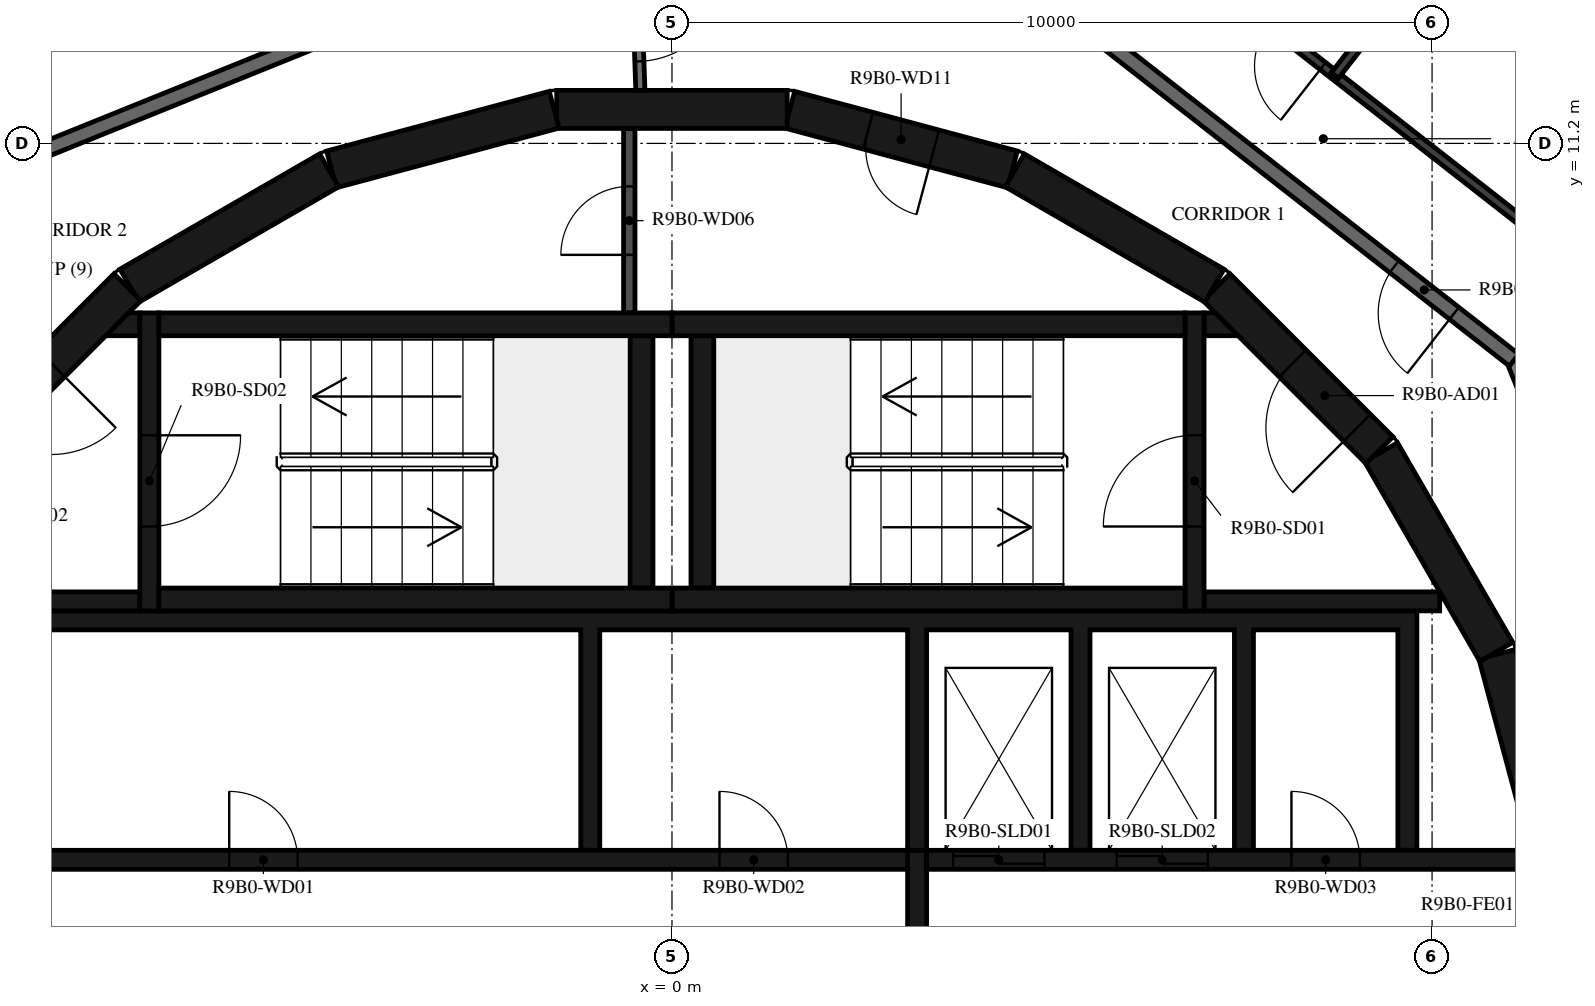
"""IFC4 building model, lengths in metres.
Left out: names, types, materials, properties, quantities, classifications, styles, units other than length and angle.
Written with IfcOpenShell. Run it as: python <this file> out.ifc"""

import sys

from ifc_helpers import new_model, si_unit, direction, frame, frame_2d, origin, place, context, subcontext, project, spatial, polyline, rectangle, outline, extrude, element, fill, save


model = new_model("IFC4")
c1 = context("Model", 3, precision=1e-05, world=origin(), true_north=direction((0.0, 1.0)))
c2 = subcontext(c1, "Body", "Model", "MODEL_VIEW")
j1 = project(units=[si_unit("LENGTHUNIT", "METRE"), si_unit("PLANEANGLEUNIT", "RADIAN")], contexts=[c1])
p1 = place(None, origin())
s1 = spatial("IfcSite", under=j1, at=p1, CompositionType="ELEMENT")
p2 = place(p1, origin())
s2 = spatial("IfcBuilding", under=s1, at=p2, CompositionType="ELEMENT")
p3 = place(p2, frame((0.0, 0.0, 347.0)))
s3 = spatial("IfcBuildingStorey", under=s2, at=p3, CompositionType="ELEMENT", Elevation=347.0)
for number, where, z_axis, x_axis in (
    (1, (11.643, 1.55, 0.0), (0.0, 0.0, 1.0), (-0.259, 0.966, 0.0)),
    (2, (10.845, 4.51, 0.0), (0.0, 0.0, 1.0), (-0.5, 0.866, 0.0)),
):
    element("IfcWall", number, at=place(p3, frame(where, z_axis=z_axis, x_axis=x_axis)), inside=s3, PredefinedType="SHEAR", context=c2, shape_type="SweptSolid", body=[
        extrude(rectangle(XDim=3.033, YDim=0.5, at=frame_2d((1.516, 0.0))), origin(), (0.0, 0.0, 1.0), 3.12),
    ])
p4 = place(p3, frame((9.308, 7.164, 0.0), z_axis=(0.0, 0.0, 1.0), x_axis=(-0.707106781187, 0.707106781187, 0.0)))
e3 = element("IfcWall", 3, at=p4, inside=s3, PredefinedType="SHEAR", context=c2, shape_type="SweptSolid", body=[
    extrude(rectangle(XDim=3.032, YDim=0.5, at=frame_2d((1.516, 0.0))), origin(), (0.0, 0.0, 1.0), 3.12),
])
p5 = place(p4, frame((0.416, 0.0, 0.0)))
e4 = element("IfcOpeningElement", 4, at=p5, cuts=e3, PredefinedType="OPENING", context=c2, shape_type="SweptSolid", body=[
    extrude(rectangle(XDim=1.2, YDim=2.1, at=frame_2d((0.6, 1.05))), frame((0.0, 0.26, 0.0), z_axis=(0.0, -1.0, 0.0), x_axis=(1.0, 0.0, 0.0)), (0.0, 0.0, 1.0), 0.52),
])
p6 = place(p3, frame((7.137, 9.329, 0.0), z_axis=(0.0, 0.0, 1.0), x_axis=(-0.865975092491, 0.500087131594, 0.0)))
e5 = element("IfcWall", 5, at=p6, inside=s3, PredefinedType="SHEAR", context=c2, shape_type="SweptSolid", body=[
    extrude(rectangle(XDim=3.033, YDim=0.5, at=frame_2d((1.516, 0.0))), origin(), (0.0, 0.0, 1.0), 3.12),
])
p7 = place(p3, frame((4.479, 10.858, 0.0), z_axis=(0.0, 0.0, 1.0), x_axis=(-0.965948410781, 0.258734743916, 0.0)))
e6 = element("IfcWall", 6, at=p7, inside=s3, PredefinedType="SHEAR", context=c2, shape_type="SweptSolid", body=[
    extrude(rectangle(XDim=3.033, YDim=0.5, at=frame_2d((1.516, 0.0))), origin(), (0.0, 0.0, 1.0), 3.12),
])
p8 = place(p7, frame((1.066, 0.0, 0.0)))
e7 = element("IfcOpeningElement", 7, at=p8, cuts=e6, PredefinedType="OPENING", context=c2, shape_type="SweptSolid", body=[
    extrude(rectangle(XDim=0.9, YDim=2.1, at=frame_2d((0.45, 1.05))), frame((0.0, 0.26, 0.0), z_axis=(0.0, -1.0, 0.0), x_axis=(1.0, 0.0, 0.0)), (0.0, 0.0, 1.0), 0.52),
])
for number, where, z_axis, x_axis in (
    (8, (1.516, 11.647, 0.0), (0.0, 0.0, 1.0), (-1.0, 0.0, 0.0)),
    (9, (-1.55, 11.643, 0.0), (0.0, 0.0, 1.0), (-0.966, -0.259, 0.0)),
    (10, (-4.51, 10.845, 0.0), (0.0, 0.0, 1.0), (-0.866, -0.5, 0.0)),
):
    element("IfcWall", number, at=place(p3, frame(where, z_axis=z_axis, x_axis=x_axis)), inside=s3, PredefinedType="SHEAR", context=c2, shape_type="SweptSolid", body=[
        extrude(rectangle(XDim=3.033, YDim=0.5, at=frame_2d((1.516, 0.0))), origin(), (0.0, 0.0, 1.0), 3.12),
    ])
p9 = place(p3, frame((-7.164, 9.308, 0.0), z_axis=(0.0, 0.0, 1.0), x_axis=(-0.707106781187, -0.707106781187, 0.0)))
e11 = element("IfcWall", 11, at=p9, inside=s3, PredefinedType="SHEAR", context=c2, shape_type="SweptSolid", body=[
    extrude(rectangle(XDim=3.032, YDim=0.5, at=frame_2d((1.516, 0.0))), origin(), (0.0, 0.0, 1.0), 3.12),
])
p10 = place(p9, frame((1.416, 0.0, 0.0)))
e12 = element("IfcOpeningElement", 12, at=p10, cuts=e11, PredefinedType="OPENING", context=c2, shape_type="SweptSolid", body=[
    extrude(rectangle(XDim=1.2, YDim=2.1, at=frame_2d((0.6, 1.05))), frame((0.0, 0.26, 0.0), z_axis=(0.0, -1.0, 0.0), x_axis=(1.0, 0.0, 0.0)), (0.0, 0.0, 1.0), 0.52),
])
for number, where, z_axis, x_axis in (
    (13, (0.0, 5.2, 0.0), (0.0, 0.0, 1.0), (1.0, 0.0, 0.0)),
    (14, (0.0, 8.82, 0.0), (0.0, 0.0, 1.0), (1.0, 0.0, 0.0)),
):
    element("IfcWall", number, at=place(p3, frame(where, z_axis=z_axis, x_axis=x_axis)), inside=s3, PredefinedType="SHEAR", context=c2, shape_type="SweptSolid", body=[
        extrude(rectangle(XDim=6.75, YDim=0.3, at=frame_2d((3.375, 0.0))), origin(), (0.0, 0.0, 1.0), 3.12),
    ])
p11 = place(p3, frame((0.4, 5.35, 0.0), z_axis=(0.0, 0.0, 1.0), x_axis=(0.0, 1.0, 0.0)))
e15 = element("IfcWall", 15, at=p11, inside=s3, PredefinedType="SHEAR", context=c2, shape_type="SweptSolid", body=[
    extrude(rectangle(XDim=3.32, YDim=0.3, at=frame_2d((1.66, 0.0))), origin(), (0.0, 0.0, 1.0), 3.12),
])
p12 = place(p3, frame((6.875, 5.05, 0.0), z_axis=(0.0, 0.0, 1.0), x_axis=(0.0, 1.0, 0.0)))
e16 = element("IfcWall", 16, at=p12, inside=s3, PredefinedType="SHEAR", context=c2, shape_type="SweptSolid", body=[
    extrude(rectangle(XDim=3.92, YDim=0.25, at=frame_2d((1.96, 0.0))), origin(), (0.0, 0.0, 1.0), 3.12),
])
p13 = place(p12, frame((1.11, 0.0, 0.0)))
e17 = element("IfcOpeningElement", 17, at=p13, cuts=e16, PredefinedType="OPENING", context=c2, shape_type="SweptSolid", body=[
    extrude(rectangle(XDim=1.2, YDim=2.1, at=frame_2d((0.6, 1.05))), frame((0.0, 0.135, 0.0), z_axis=(0.0, -1.0, 0.0), x_axis=(1.0, 0.0, 0.0)), (0.0, 0.0, 1.0), 0.27),
])
p14 = place(p3, frame((7.0, 5.175, 0.0), z_axis=(0.0, 0.0, 1.0), x_axis=(1.0, 0.0, 0.0)))
e18 = element("IfcWall", 18, at=p14, inside=s3, PredefinedType="SHEAR", context=c2, shape_type="SweptSolid", body=[
    extrude(rectangle(XDim=3.1, YDim=0.25, at=frame_2d((1.55, 0.0))), origin(), (0.0, 0.0, 1.0), 3.12),
])
p15 = place(p3, origin())
e19 = element("IfcWall", 19, at=p15, inside=s3, PredefinedType="SHEAR", context=c2, shape_type="SweptSolid", body=[
    extrude(outline(polyline([(7.448, 8.67), (7.0, 8.67), (7.0, 8.97), (7.148, 8.97), (7.448, 8.67)])), origin(), (0.0, 0.0, 1.0), 3.12),
])
for number, where, z_axis, x_axis in (
    (20, (-6.75, 5.2, 0.0), (0.0, 0.0, 1.0), (1.0, 0.0, 0.0)),
    (21, (-6.75, 8.82, 0.0), (0.0, 0.0, 1.0), (1.0, 0.0, 0.0)),
):
    element("IfcWall", number, at=place(p3, frame(where, z_axis=z_axis, x_axis=x_axis)), inside=s3, PredefinedType="SHEAR", context=c2, shape_type="SweptSolid", body=[
        extrude(rectangle(XDim=6.75, YDim=0.3, at=frame_2d((3.375, 0.0))), origin(), (0.0, 0.0, 1.0), 3.12),
    ])
p16 = place(p3, frame((-0.4, 5.35, 0.0), z_axis=(0.0, 0.0, 1.0), x_axis=(0.0, 1.0, 0.0)))
e22 = element("IfcWall", 22, at=p16, inside=s3, PredefinedType="SHEAR", context=c2, shape_type="SweptSolid", body=[
    extrude(rectangle(XDim=3.32, YDim=0.3, at=frame_2d((1.66, 0.0))), origin(), (0.0, 0.0, 1.0), 3.12),
])
p17 = place(p3, frame((-6.875, 8.97, 0.0), z_axis=(0.0, 0.0, 1.0), x_axis=(0.0, -1.0, 0.0)))
e23 = element("IfcWall", 23, at=p17, inside=s3, PredefinedType="SHEAR", context=c2, shape_type="SweptSolid", body=[
    extrude(rectangle(XDim=3.92, YDim=0.25, at=frame_2d((1.96, 0.0))), origin(), (0.0, 0.0, 1.0), 3.12),
])
p18 = place(p17, frame((1.61, 0.0, 0.0)))
e24 = element("IfcOpeningElement", 24, at=p18, cuts=e23, PredefinedType="OPENING", context=c2, shape_type="SweptSolid", body=[
    extrude(rectangle(XDim=1.2, YDim=2.1, at=frame_2d((0.6, 1.05))), frame((0.0, 0.135, 0.0), z_axis=(0.0, -1.0, 0.0), x_axis=(1.0, 0.0, 0.0)), (0.0, 0.0, 1.0), 0.27),
])
p19 = place(p3, frame((-7.0, 5.175, 0.0), z_axis=(0.0, 0.0, 1.0), x_axis=(-1.0, 0.0, 0.0)))
e25 = element("IfcWall", 25, at=p19, inside=s3, PredefinedType="SHEAR", context=c2, shape_type="SweptSolid", body=[
    extrude(rectangle(XDim=3.1, YDim=0.25, at=frame_2d((1.55, 0.0))), origin(), (0.0, 0.0, 1.0), 3.12),
])
p20 = place(p3, origin())
e26 = element("IfcWall", 26, at=p20, inside=s3, PredefinedType="SHEAR", context=c2, shape_type="SweptSolid", body=[
    extrude(outline(polyline([(-7.148, 8.97), (-7.0, 8.97), (-7.0, 8.67), (-7.448, 8.67), (-7.148, 8.97)])), origin(), (0.0, 0.0, 1.0), 3.12),
])
p21 = place(p3, origin())
e27 = element("IfcWall", 27, at=p21, inside=s3, PredefinedType="SHEAR", context=c2, shape_type="SweptSolid", body=[
    extrude(outline(polyline([(-9.8, 1.9), (-9.55, 1.9), (-9.55, 4.8), (-1.2, 4.8), (-1.2, 1.9), (-0.95, 1.9), (-0.95, 4.8), (3.1, 4.8), (3.1, 1.9), (3.35, 1.9), (3.35, 4.8), (5.25, 4.8), (5.25, 1.9), (5.5, 1.9), (5.5, 4.8), (7.4, 4.8), (7.4, 1.9), (7.65, 1.9), (7.65, 4.8), (9.55, 4.8), (9.55, 1.9), (9.8, 1.9), (9.8, 4.8), (9.8, 5.05), (-9.8, 5.05), (-9.8, 4.8), (-9.8, 1.9)])), origin(), (0.0, 0.0, 1.0), 3.12),
])
p22 = place(p3, frame((-11.28, 1.775, 0.0), z_axis=(0.0, 0.0, 1.0), x_axis=(1.0, 0.0, 0.0)))
e28 = element("IfcWall", 28, at=p22, inside=s3, PredefinedType="SHEAR", context=c2, shape_type="SweptSolid", body=[
    extrude(rectangle(XDim=14.38, YDim=0.25, at=frame_2d((7.19, 0.0))), origin(), (0.0, 0.0, 1.0), 3.12),
])
p23 = place(p22, frame((5.455, 0.0, 0.0)))
e29 = element("IfcOpeningElement", 29, at=p23, cuts=e28, PredefinedType="OPENING", context=c2, shape_type="SweptSolid", body=[
    extrude(rectangle(XDim=0.9, YDim=2.1, at=frame_2d((0.45, 1.05))), frame((0.0, 0.135, 0.0), z_axis=(0.0, -1.0, 0.0), x_axis=(1.0, 0.0, 0.0)), (0.0, 0.0, 1.0), 0.27),
])
p24 = place(p22, frame((11.905, 0.0, 0.0)))
e30 = element("IfcOpeningElement", 30, at=p24, cuts=e28, PredefinedType="OPENING", context=c2, shape_type="SweptSolid", body=[
    extrude(rectangle(XDim=0.9, YDim=2.1, at=frame_2d((0.45, 1.05))), frame((0.0, 0.135, 0.0), z_axis=(0.0, -1.0, 0.0), x_axis=(1.0, 0.0, 0.0)), (0.0, 0.0, 1.0), 0.27),
])
p25 = place(p3, frame((3.35, 1.775, 0.0), z_axis=(0.0, 0.0, 1.0), x_axis=(1.0, 0.0, 0.0)))
e31 = element("IfcWall", 31, at=p25, inside=s3, PredefinedType="SHEAR", context=c2, shape_type="SweptSolid", body=[
    extrude(rectangle(XDim=7.93, YDim=0.25, at=frame_2d((3.965, 0.0))), origin(), (0.0, 0.0, 1.0), 3.12),
])
p26 = place(p25, frame((0.35, 0.0, 0.0)))
e32 = element("IfcOpeningElement", 32, at=p26, cuts=e31, PredefinedType="OPENING", context=c2, shape_type="SweptSolid", body=[
    extrude(rectangle(XDim=1.2, YDim=2.4, at=frame_2d((0.6, 1.2))), frame((0.0, 0.135, 0.0), z_axis=(0.0, -1.0, 0.0), x_axis=(1.0, 0.0, 0.0)), (0.0, 0.0, 1.0), 0.27),
])
p27 = place(p25, frame((2.5, 0.0, 0.0)))
e33 = element("IfcOpeningElement", 33, at=p27, cuts=e31, PredefinedType="OPENING", context=c2, shape_type="SweptSolid", body=[
    extrude(rectangle(XDim=1.2, YDim=2.4, at=frame_2d((0.6, 1.2))), frame((0.0, 0.135, 0.0), z_axis=(0.0, -1.0, 0.0), x_axis=(1.0, 0.0, 0.0)), (0.0, 0.0, 1.0), 0.27),
])
p28 = place(p25, frame((4.8, 0.0, 0.0)))
e34 = element("IfcOpeningElement", 34, at=p28, cuts=e31, PredefinedType="OPENING", context=c2, shape_type="SweptSolid", body=[
    extrude(rectangle(XDim=0.9, YDim=2.1, at=frame_2d((0.45, 1.05))), frame((0.0, 0.135, 0.0), z_axis=(0.0, -1.0, 0.0), x_axis=(1.0, 0.0, 0.0)), (0.0, 0.0, 1.0), 0.27),
])
p29 = place(p3, frame((3.225, -1.9, 0.0), z_axis=(0.0, 0.0, 1.0), x_axis=(0.0, 1.0, 0.0)))
e35 = element("IfcWall", 35, at=p29, inside=s3, PredefinedType="SHEAR", context=c2, shape_type="SweptSolid", body=[
    extrude(rectangle(XDim=3.8, YDim=0.25, at=frame_2d((1.9, 0.0))), origin(), (0.0, 0.0, 1.0), 3.12),
])
p30 = place(p3, frame((-0.562, 8.97, 0.0), z_axis=(0.0, 0.0, 1.0), x_axis=(0.0, 1.0, 0.0)))
e36 = element("IfcWall", 36, at=p30, inside=s3, PredefinedType="PARTITIONING", context=c2, shape_type="SweptSolid", body=[
    extrude(rectangle(XDim=2.427, YDim=0.15, at=frame_2d((1.214, 0.0))), origin(), (0.0, 0.0, 1.0), 3.12),
])
p31 = place(p30, frame((0.764, 0.0, 0.0)))
e37 = element("IfcOpeningElement", 37, at=p31, cuts=e36, PredefinedType="OPENING", context=c2, shape_type="SweptSolid", body=[
    extrude(rectangle(XDim=0.9, YDim=2.1, at=frame_2d((0.45, 1.05))), frame((0.0, 0.085, 0.0), z_axis=(0.0, -1.0, 0.0), x_axis=(1.0, 0.0, 0.0)), (0.0, 0.0, 1.0), 0.17),
])
p32 = place(p3, frame((-0.475, 13.598, 0.0), z_axis=(0.0, 0.0, 1.0), x_axis=(0.034852521429, -0.999392466326, 0.0)))
e38 = element("IfcWall", 38, at=p32, inside=s3, PredefinedType="PARTITIONING", context=c2, shape_type="SweptSolid", body=[
    extrude(rectangle(XDim=1.702, YDim=0.12, at=frame_2d((0.851, 0.0))), origin(), (0.0, 0.0, 1.0), 3.12),
])
p33 = place(p32, frame((0.12, 0.0, 0.0)))
e39 = element("IfcOpeningElement", 39, at=p33, cuts=e38, PredefinedType="OPENING", context=c2, shape_type="SweptSolid", body=[
    extrude(rectangle(XDim=1.2, YDim=2.1, at=frame_2d((0.6, 1.05))), frame((0.0, 0.07, 0.0), z_axis=(0.0, -1.0, 0.0), x_axis=(1.0, 0.0, 0.0)), (0.0, 0.0, 1.0), 0.14),
])
p34 = place(p3, frame((13.769, 1.691, 0.0), z_axis=(0.0, 0.0, 1.0), x_axis=(-0.374618189599, 0.92717916932, 0.0)))
e40 = element("IfcWall", 40, at=p34, inside=s3, PredefinedType="STANDARD", context=c2, shape_type="SweptSolid", body=[
    extrude(rectangle(XDim=7.181, YDim=0.2, at=frame_2d((3.591, 0.0))), origin(), (0.0, 0.0, 1.0), 3.12),
])
p35 = place(p34, frame((2.371, 0.0, 0.0)))
e41 = element("IfcOpeningElement", 41, at=p35, cuts=e40, PredefinedType="OPENING", context=c2, shape_type="SweptSolid", body=[
    extrude(rectangle(XDim=1.0, YDim=2.1, at=frame_2d((0.5, 1.05))), frame((0.0, 0.11, 0.0), z_axis=(0.0, -1.0, 0.0), x_axis=(1.0, 0.0, 0.0)), (0.0, 0.0, 1.0), 0.22),
])
p36 = place(p3, frame((11.079, 8.349, 0.0), z_axis=(0.0, 0.0, 1.0), x_axis=(-0.78800478687, 0.615669112324, 0.0)))
e42 = element("IfcWall", 42, at=p36, inside=s3, PredefinedType="STANDARD", context=c2, shape_type="SweptSolid", body=[
    extrude(rectangle(XDim=7.181, YDim=0.2, at=frame_2d((3.591, 0.0))), origin(), (0.0, 0.0, 1.0), 3.12),
])
p37 = place(p36, frame((1.0, 0.0, 0.0)))
e43 = element("IfcOpeningElement", 43, at=p37, cuts=e42, PredefinedType="OPENING", context=c2, shape_type="SweptSolid", body=[
    extrude(rectangle(XDim=1.0, YDim=2.1, at=frame_2d((0.5, 1.05))), frame((0.0, 0.11, 0.0), z_axis=(0.0, -1.0, 0.0), x_axis=(1.0, 0.0, 0.0)), (0.0, 0.0, 1.0), 0.22),
])
p38 = place(p3, frame((-1.691, 13.769, 0.0), z_axis=(0.0, 0.0, 1.0), x_axis=(-0.92717916932, -0.374618189599, 0.0)))
e44 = element("IfcWall", 44, at=p38, inside=s3, PredefinedType="STANDARD", context=c2, shape_type="SweptSolid", body=[
    extrude(rectangle(XDim=7.181, YDim=0.2, at=frame_2d((3.591, 0.0))), origin(), (0.0, 0.0, 1.0), 3.12),
])
p39 = place(p3, frame((12.319, 9.283, 0.0), z_axis=(0.0, 0.0, 1.0), x_axis=(-0.788000268464, 0.61567489546, 0.0)))
e45 = element("IfcWall", 45, at=p39, inside=s3, PredefinedType="PARTITIONING", context=c2, shape_type="SweptSolid", body=[
    extrude(rectangle(XDim=7.985, YDim=0.12, at=frame_2d((3.992, 0.0))), origin(), (0.0, 0.0, 1.0), 3.12),
])
p40 = place(p39, frame((4.765, 0.0, 0.0)))
e46 = element("IfcOpeningElement", 46, at=p40, cuts=e45, PredefinedType="OPENING", context=c2, shape_type="SweptSolid", body=[
    extrude(rectangle(XDim=0.9, YDim=2.1, at=frame_2d((0.45, 1.05))), frame((0.0, 0.07, 0.0), z_axis=(0.0, -1.0, 0.0), x_axis=(1.0, 0.0, 0.0)), (0.0, 0.0, 1.0), 0.14),
])
p41 = place(p3, frame((11.315, 15.414, 0.0), z_axis=(0.0, 0.0, 1.0), x_axis=(-0.615656413137, -0.788014708596, 0.0)))
e47 = element("IfcWall", 47, at=p41, inside=s3, PredefinedType="PARTITIONING", context=c2, shape_type="SweptSolid", body=[
    extrude(rectangle(XDim=4.213, YDim=0.12, at=frame_2d((2.106, 0.0))), origin(), (0.0, 0.0, 1.0), 3.12),
])
p42 = place(p13, origin())
e48 = element("IfcDoor", 48, at=p42, inside=s3, OperationType="SINGLE_SWING_LEFT", PredefinedType="DOOR", context=c2, shape_type="SweptSolid", body=[
    extrude(rectangle(XDim=1.2, YDim=2.1, at=frame_2d((0.6, 1.05))), frame((0.0, 0.025, 0.0), z_axis=(0.0, -1.0, 0.0), x_axis=(1.0, 0.0, 0.0)), (0.0, 0.0, 1.0), 0.05),
])
fill(e17, e48)
p43 = place(p5, origin())
e49 = element("IfcDoor", 49, at=p43, inside=s3, OperationType="SINGLE_SWING_RIGHT", PredefinedType="DOOR", context=c2, shape_type="SweptSolid", body=[
    extrude(rectangle(XDim=1.2, YDim=2.1, at=frame_2d((0.6, 1.05))), frame((0.0, 0.025, 0.0), z_axis=(0.0, -1.0, 0.0), x_axis=(1.0, 0.0, 0.0)), (0.0, 0.0, 1.0), 0.05),
])
fill(e4, e49)
p44 = place(p18, origin())
e50 = element("IfcDoor", 50, at=p44, inside=s3, OperationType="SINGLE_SWING_LEFT", PredefinedType="DOOR", context=c2, shape_type="SweptSolid", body=[
    extrude(rectangle(XDim=1.2, YDim=2.1, at=frame_2d((0.6, 1.05))), frame((0.0, 0.025, 0.0), z_axis=(0.0, -1.0, 0.0), x_axis=(1.0, 0.0, 0.0)), (0.0, 0.0, 1.0), 0.05),
])
fill(e24, e50)
p45 = place(p10, origin())
e51 = element("IfcDoor", 51, at=p45, inside=s3, OperationType="SINGLE_SWING_RIGHT", PredefinedType="DOOR", context=c2, shape_type="SweptSolid", body=[
    extrude(rectangle(XDim=1.2, YDim=2.1, at=frame_2d((0.6, 1.05))), frame((0.0, 0.025, 0.0), z_axis=(0.0, -1.0, 0.0), x_axis=(1.0, 0.0, 0.0)), (0.0, 0.0, 1.0), 0.05),
])
fill(e12, e51)
p46 = place(p26, origin())
e52 = element("IfcDoor", 52, at=p46, inside=s3, OperationType="DOUBLE_DOOR_SLIDING", PredefinedType="DOOR", context=c2, shape_type="SweptSolid", body=[
    extrude(rectangle(XDim=1.2, YDim=2.4, at=frame_2d((0.6, 1.2))), frame((0.0, 0.025, 0.0), z_axis=(0.0, -1.0, 0.0), x_axis=(1.0, 0.0, 0.0)), (0.0, 0.0, 1.0), 0.05),
])
fill(e32, e52)
p47 = place(p27, origin())
e53 = element("IfcDoor", 53, at=p47, inside=s3, OperationType="DOUBLE_DOOR_SLIDING", PredefinedType="DOOR", context=c2, shape_type="SweptSolid", body=[
    extrude(rectangle(XDim=1.2, YDim=2.4, at=frame_2d((0.6, 1.2))), frame((0.0, 0.025, 0.0), z_axis=(0.0, -1.0, 0.0), x_axis=(1.0, 0.0, 0.0)), (0.0, 0.0, 1.0), 0.05),
])
fill(e33, e53)
p48 = place(p23, origin())
e54 = element("IfcDoor", 54, at=p48, inside=s3, OperationType="SINGLE_SWING_LEFT", PredefinedType="DOOR", context=c2, shape_type="SweptSolid", body=[
    extrude(rectangle(XDim=0.9, YDim=2.1, at=frame_2d((0.45, 1.05))), frame((0.0, 0.025, 0.0), z_axis=(0.0, -1.0, 0.0), x_axis=(1.0, 0.0, 0.0)), (0.0, 0.0, 1.0), 0.05),
])
fill(e29, e54)
p49 = place(p24, origin())
e55 = element("IfcDoor", 55, at=p49, inside=s3, OperationType="SINGLE_SWING_RIGHT", PredefinedType="DOOR", context=c2, shape_type="SweptSolid", body=[
    extrude(rectangle(XDim=0.9, YDim=2.1, at=frame_2d((0.45, 1.05))), frame((0.0, 0.025, 0.0), z_axis=(0.0, -1.0, 0.0), x_axis=(1.0, 0.0, 0.0)), (0.0, 0.0, 1.0), 0.05),
])
fill(e30, e55)
p50 = place(p28, origin())
e56 = element("IfcDoor", 56, at=p50, inside=s3, OperationType="SINGLE_SWING_LEFT", PredefinedType="DOOR", context=c2, shape_type="SweptSolid", body=[
    extrude(rectangle(XDim=0.9, YDim=2.1, at=frame_2d((0.45, 1.05))), frame((0.0, 0.025, 0.0), z_axis=(0.0, -1.0, 0.0), x_axis=(1.0, 0.0, 0.0)), (0.0, 0.0, 1.0), 0.05),
])
fill(e34, e56)
p51 = place(p31, origin())
e57 = element("IfcDoor", 57, at=p51, inside=s3, OperationType="SINGLE_SWING_RIGHT", PredefinedType="DOOR", context=c2, shape_type="SweptSolid", body=[
    extrude(rectangle(XDim=0.9, YDim=2.1, at=frame_2d((0.45, 1.05))), frame((0.0, 0.025, 0.0), z_axis=(0.0, -1.0, 0.0), x_axis=(1.0, 0.0, 0.0)), (0.0, 0.0, 1.0), 0.05),
])
fill(e37, e57)
p52 = place(p8, origin())
e58 = element("IfcDoor", 58, at=p52, inside=s3, OperationType="SINGLE_SWING_LEFT", PredefinedType="DOOR", context=c2, shape_type="SweptSolid", body=[
    extrude(rectangle(XDim=0.9, YDim=2.1, at=frame_2d((0.45, 1.05))), frame((0.0, 0.025, 0.0), z_axis=(0.0, -1.0, 0.0), x_axis=(1.0, 0.0, 0.0)), (0.0, 0.0, 1.0), 0.05),
])
fill(e7, e58)
p53 = place(p37, origin())
e59 = element("IfcDoor", 59, at=p53, inside=s3, OperationType="SINGLE_SWING_LEFT", PredefinedType="DOOR", context=c2, shape_type="SweptSolid", body=[
    extrude(rectangle(XDim=1.0, YDim=2.1, at=frame_2d((0.5, 1.05))), frame((0.0, 0.025, 0.0), z_axis=(0.0, -1.0, 0.0), x_axis=(1.0, 0.0, 0.0)), (0.0, 0.0, 1.0), 0.05),
])
fill(e43, e59)
p54 = place(p40, origin())
e60 = element("IfcDoor", 60, at=p54, inside=s3, OperationType="SINGLE_SWING_LEFT", PredefinedType="DOOR", context=c2, shape_type="SweptSolid", body=[
    extrude(rectangle(XDim=0.9, YDim=2.1, at=frame_2d((0.45, 1.05))), frame((0.0, 0.025, 0.0), z_axis=(0.0, -1.0, 0.0), x_axis=(1.0, 0.0, 0.0)), (0.0, 0.0, 1.0), 0.05),
])
fill(e46, e60)
p55 = place(p33, origin())
e61 = element("IfcDoor", 61, at=p55, inside=s3, OperationType="DOUBLE_DOOR_SINGLE_SWING", PredefinedType="DOOR", context=c2, shape_type="SweptSolid", body=[
    extrude(rectangle(XDim=1.2, YDim=2.1, at=frame_2d((0.6, 1.05))), frame((0.0, 0.025, 0.0), z_axis=(0.0, -1.0, 0.0), x_axis=(1.0, 0.0, 0.0)), (0.0, 0.0, 1.0), 0.05),
])
fill(e39, e61)
save(model, sys.argv[1])
